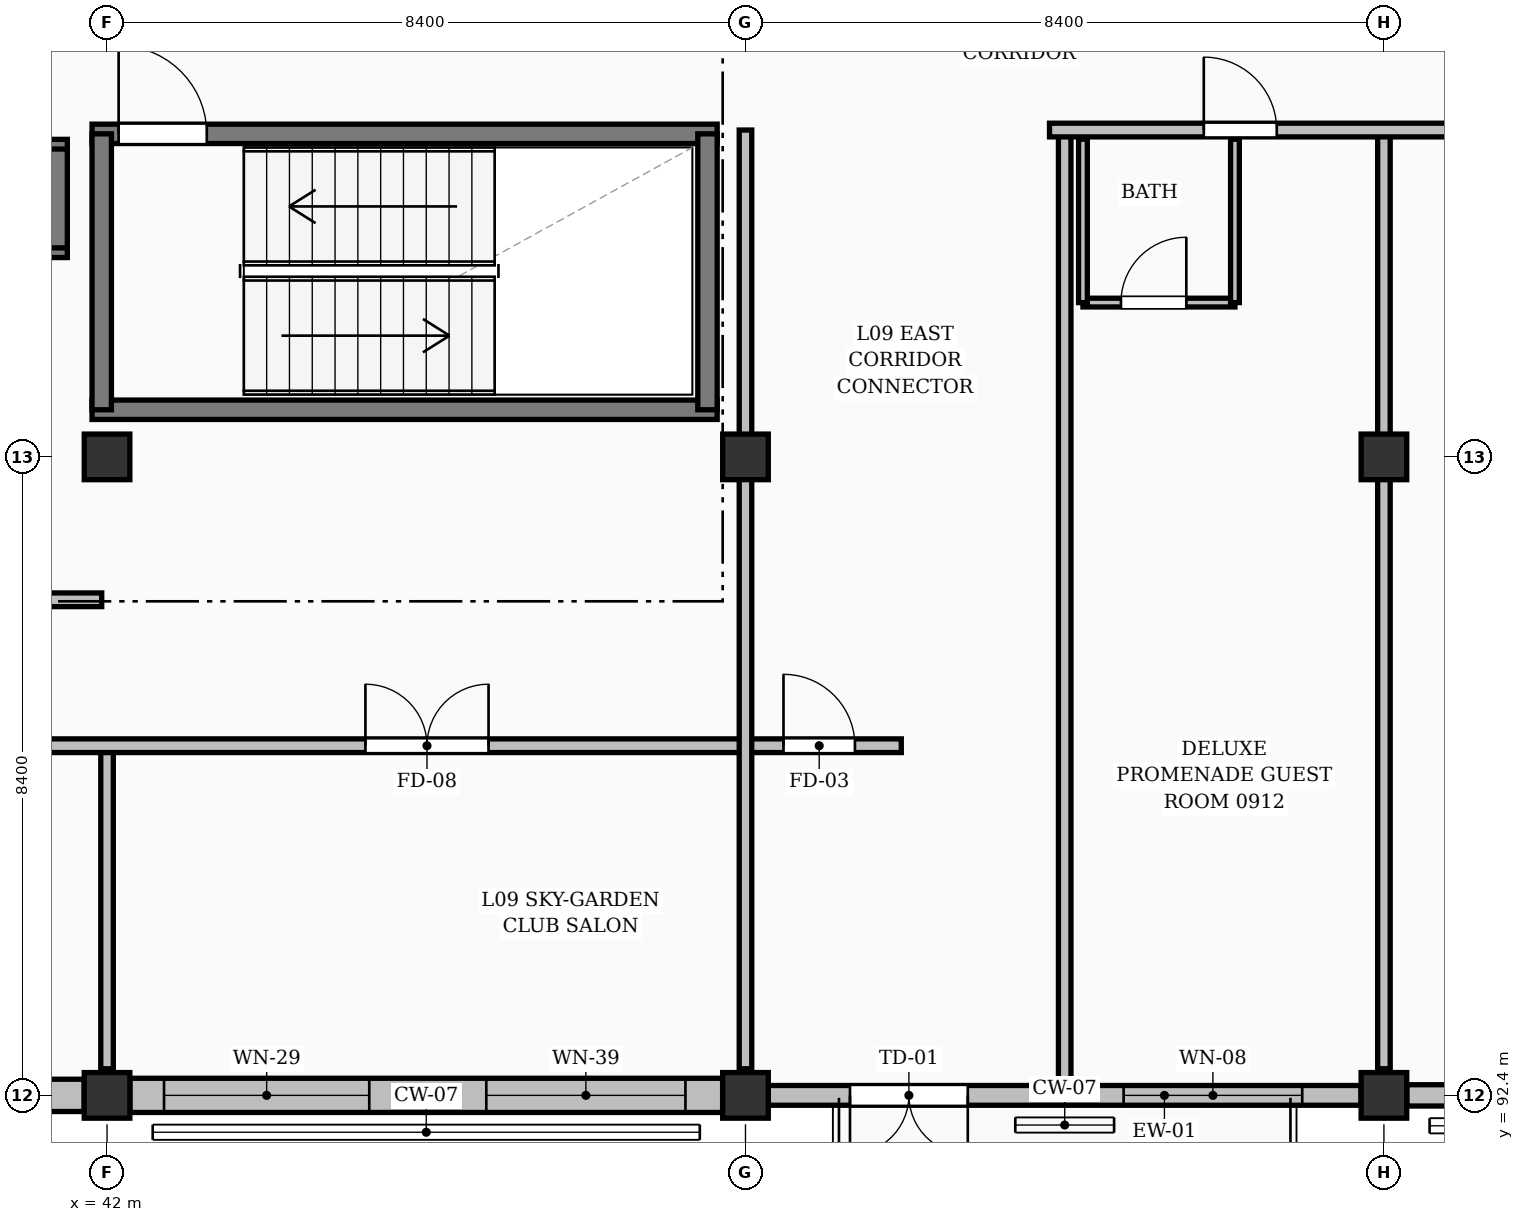
"""IFC4 building model, lengths in metres.
Left out: names, types, materials, properties, quantities, classifications, styles, units other than length and angle.
Written with IfcOpenShell. Run it as: python <this file> out.ifc"""

import sys

from ifc_helpers import new_model, si_unit, direction, frame, frame_2d, origin, origin_2d, place, context, subcontext, project, spatial, rectangle, extrude, element, fill, save


model = new_model("IFC4")
c1 = context("Model", 3, precision=1e-05, world=origin(), true_north=direction((0.0, 1.0)))
c2 = subcontext(c1, "Body", "Model", "MODEL_VIEW")
j1 = project(units=[si_unit("LENGTHUNIT", "METRE"), si_unit("PLANEANGLEUNIT", "RADIAN")], contexts=[c1])
p1 = place(None, origin())
s1 = spatial("IfcSite", under=j1, at=p1, CompositionType="ELEMENT")
p2 = place(p1, origin())
s2 = spatial("IfcBuilding", under=s1, at=p2, CompositionType="ELEMENT")
p3 = place(p2, frame((0.0, 0.0, 31.92)))
s3 = spatial("IfcBuildingStorey", under=s2, at=p3, CompositionType="ELEMENT", Elevation=31.92)
for number, where, z_axis, x_axis in (
    (1, (42.0, 92.4, 0.0), (0.0, 0.0, 1.0), (1.0, 0.0, 0.0)),
    (2, (42.0, 100.8, 0.0), (0.0, 0.0, 1.0), (1.0, 0.0, 0.0)),
    (3, (50.4, 92.4, 0.0), (0.0, 0.0, 1.0), (1.0, 0.0, 0.0)),
    (4, (50.4, 100.8, 0.0), (0.0, 0.0, 1.0), (1.0, 0.0, 0.0)),
    (5, (58.8, 92.4, 0.0), (0.0, 0.0, 1.0), (1.0, 0.0, 0.0)),
    (6, (58.8, 100.8, 0.0), (0.0, 0.0, 1.0), (1.0, 0.0, 0.0)),
):
    element("IfcColumn", number, at=place(p3, frame(where, z_axis=z_axis, x_axis=x_axis)), inside=s3, PredefinedType="COLUMN", context=c2, shape_type="SweptSolid", body=[
        extrude(rectangle(XDim=0.6, YDim=0.6, at=origin_2d()), origin(), (0.0, 0.0, 1.0), 3.36),
    ])
p4 = place(p3, frame((33.901, 92.4, 0.0), z_axis=(0.0, 0.0, 1.0), x_axis=(1.0, 0.0, 0.0)))
e7 = element("IfcWall", 7, at=p4, inside=s3, PredefinedType="SOLIDWALL", context=c2, shape_type="SweptSolid", body=[
    extrude(rectangle(XDim=7.798, YDim=0.425, at=frame_2d((3.899, 0.0))), origin(), (0.0, 0.0, 1.0), 2.474),
])
p5 = place(p4, frame((0.974, 0.0, 0.0)))
e8 = element("IfcOpeningElement", 8, at=p5, cuts=e7, PredefinedType="OPENING", context=c2, shape_type="SweptSolid", body=[
    extrude(rectangle(XDim=1.75, YDim=2.08, at=frame_2d((0.875, 1.04))), frame((0.0, 0.223, 0.0), z_axis=(0.0, -1.0, 0.0), x_axis=(1.0, 0.0, 0.0)), (0.0, 0.0, 1.0), 0.445),
])
p6 = place(p4, frame((4.724, 0.0, 0.25)))
e9 = element("IfcOpeningElement", 9, at=p6, cuts=e7, PredefinedType="OPENING", context=c2, shape_type="SweptSolid", body=[
    extrude(rectangle(XDim=2.25, YDim=2.05, at=frame_2d((1.125, 1.025))), frame((0.0, 0.223, 0.0), z_axis=(0.0, -1.0, 0.0), x_axis=(1.0, 0.0, 0.0)), (0.0, 0.0, 1.0), 0.445),
])
p7 = place(p3, frame((42.301, 92.4, 0.0), z_axis=(0.0, 0.0, 1.0), x_axis=(1.0, 0.0, 0.0)))
e10 = element("IfcWall", 10, at=p7, inside=s3, PredefinedType="SOLIDWALL", context=c2, shape_type="SweptSolid", body=[
    extrude(rectangle(XDim=7.798, YDim=0.45, at=frame_2d((3.899, 0.0))), origin(), (0.0, 0.0, 1.0), 2.474),
])
p8 = place(p7, frame((0.449, 0.0, 0.25)))
e11 = element("IfcOpeningElement", 11, at=p8, cuts=e10, PredefinedType="OPENING", context=c2, shape_type="SweptSolid", body=[
    extrude(rectangle(XDim=2.7, YDim=1.75, at=frame_2d((1.35, 0.875))), frame((0.0, 0.235, 0.0), z_axis=(0.0, -1.0, 0.0), x_axis=(1.0, 0.0, 0.0)), (0.0, 0.0, 1.0), 0.47),
])
p9 = place(p7, frame((4.689, 0.0, 0.25)))
e12 = element("IfcOpeningElement", 12, at=p9, cuts=e10, PredefinedType="OPENING", context=c2, shape_type="SweptSolid", body=[
    extrude(rectangle(XDim=2.62, YDim=1.9, at=frame_2d((1.31, 0.95))), frame((0.0, 0.235, 0.0), z_axis=(0.0, -1.0, 0.0), x_axis=(1.0, 0.0, 0.0)), (0.0, 0.0, 1.0), 0.47),
])
p10 = place(p3, frame((50.701, 92.4, 0.0), z_axis=(0.0, 0.0, 1.0), x_axis=(1.0, 0.0, 0.0)))
e13 = element("IfcWall", 13, at=p10, inside=s3, PredefinedType="SOLIDWALL", context=c2, shape_type="SweptSolid", body=[
    extrude(rectangle(XDim=7.798, YDim=0.26, at=frame_2d((3.899, 0.0))), origin(), (0.0, 0.0, 1.0), 2.414),
])
p11 = place(p10, frame((1.074, 0.0, 0.0)))
e14 = element("IfcOpeningElement", 14, at=p11, cuts=e13, PredefinedType="OPENING", context=c2, shape_type="SweptSolid", body=[
    extrude(rectangle(XDim=1.55, YDim=2.08, at=frame_2d((0.775, 1.04))), frame((0.0, 0.14, 0.0), z_axis=(0.0, -1.0, 0.0), x_axis=(1.0, 0.0, 0.0)), (0.0, 0.0, 1.0), 0.28),
])
p12 = place(p10, frame((4.674, 0.0, 0.25)))
e15 = element("IfcOpeningElement", 15, at=p12, cuts=e13, PredefinedType="OPENING", context=c2, shape_type="SweptSolid", body=[
    extrude(rectangle(XDim=2.35, YDim=1.95, at=frame_2d((1.175, 0.975))), frame((0.0, 0.14, 0.0), z_axis=(0.0, -1.0, 0.0), x_axis=(1.0, 0.0, 0.0)), (0.0, 0.0, 1.0), 0.28),
])
p13 = place(p3, frame((59.101, 92.4, 0.0), z_axis=(0.0, 0.0, 1.0), x_axis=(1.0, 0.0, 0.0)))
e16 = element("IfcWall", 16, at=p13, inside=s3, PredefinedType="SOLIDWALL", context=c2, shape_type="SweptSolid", body=[
    extrude(rectangle(XDim=7.798, YDim=0.28, at=frame_2d((3.899, 0.0))), origin(), (0.0, 0.0, 1.0), 2.414),
])
p14 = place(p13, frame((0.549, 0.0, 0.25)))
e17 = element("IfcOpeningElement", 17, at=p14, cuts=e16, PredefinedType="OPENING", context=c2, shape_type="SweptSolid", body=[
    extrude(rectangle(XDim=2.5, YDim=1.75, at=frame_2d((1.25, 0.875))), frame((0.0, 0.15, 0.0), z_axis=(0.0, -1.0, 0.0), x_axis=(1.0, 0.0, 0.0)), (0.0, 0.0, 1.0), 0.3),
])
p15 = place(p13, frame((4.649, 0.0, 0.25)))
e18 = element("IfcOpeningElement", 18, at=p15, cuts=e16, PredefinedType="OPENING", context=c2, shape_type="SweptSolid", body=[
    extrude(rectangle(XDim=2.7, YDim=1.75, at=frame_2d((1.35, 0.875))), frame((0.0, 0.15, 0.0), z_axis=(0.0, -1.0, 0.0), x_axis=(1.0, 0.0, 0.0)), (0.0, 0.0, 1.0), 0.3),
])
p16 = place(p3, frame((41.802, 101.42, 0.0), z_axis=(0.0, 0.0, 1.0), x_axis=(1.0, 0.0, 0.0)))
e19 = element("IfcWall", 19, at=p16, inside=s3, PredefinedType="SOLIDWALL", context=c2, shape_type="SweptSolid", body=[
    extrude(rectangle(XDim=8.225, YDim=0.255, at=frame_2d((4.113, 0.0))), origin(), (0.0, 0.0, 1.0), 3.1),
])
p17 = place(p3, frame((41.802, 105.05, 0.0), z_axis=(0.0, 0.0, 1.0), x_axis=(1.0, 0.0, 0.0)))
e20 = element("IfcWall", 20, at=p17, inside=s3, PredefinedType="SOLIDWALL", context=c2, shape_type="SweptSolid", body=[
    extrude(rectangle(XDim=8.225, YDim=0.255, at=frame_2d((4.113, 0.0))), origin(), (0.0, 0.0, 1.0), 3.1),
])
p18 = place(p17, frame((0.35, 0.0, 0.0)))
e21 = element("IfcOpeningElement", 21, at=p18, cuts=e20, PredefinedType="OPENING", context=c2, shape_type="SweptSolid", body=[
    extrude(rectangle(XDim=1.16, YDim=2.15, at=frame_2d((0.58, 1.075))), frame((0.0, 0.137, 0.0), z_axis=(0.0, -1.0, 0.0), x_axis=(1.0, 0.0, 0.0)), (0.0, 0.0, 1.0), 0.275),
])
for number, where, z_axis, x_axis in (
    (22, (41.93, 101.42, 0.0), (0.0, 0.0, 1.0), (0.0, 1.0, 0.0)),
    (23, (49.9, 101.42, 0.0), (0.0, 0.0, 1.0), (0.0, 1.0, 0.0)),
):
    element("IfcWall", number, at=place(p3, frame(where, z_axis=z_axis, x_axis=x_axis)), inside=s3, PredefinedType="SOLIDWALL", context=c2, shape_type="SweptSolid", body=[
        extrude(rectangle(XDim=3.63, YDim=0.255, at=frame_2d((1.815, 0.0))), origin(), (0.0, 0.0, 1.0), 3.1),
    ])
p19 = place(p3, frame((39.522, 103.55, 0.0), z_axis=(0.0, 0.0, 1.0), x_axis=(1.0, 0.0, 0.0)))
e24 = element("IfcWall", 24, at=p19, inside=s3, PredefinedType="SOLIDWALL", context=c2, shape_type="SweptSolid", body=[
    extrude(rectangle(XDim=1.955, YDim=0.255, at=frame_2d((0.978, 0.0))), origin(), (0.0, 0.0, 1.0), 3.1),
])
p20 = place(p3, frame((39.522, 104.85, 0.0), z_axis=(0.0, 0.0, 1.0), x_axis=(1.0, 0.0, 0.0)))
e25 = element("IfcWall", 25, at=p20, inside=s3, PredefinedType="SOLIDWALL", context=c2, shape_type="SweptSolid", body=[
    extrude(rectangle(XDim=1.955, YDim=0.255, at=frame_2d((0.978, 0.0))), origin(), (0.0, 0.0, 1.0), 3.1),
])
p21 = place(p20, frame((0.508, 0.0, 0.0)))
e26 = element("IfcOpeningElement", 26, at=p21, cuts=e25, PredefinedType="OPENING", context=c2, shape_type="SweptSolid", body=[
    extrude(rectangle(XDim=0.94, YDim=2.1, at=frame_2d((0.47, 1.05))), frame((0.0, 0.137, 0.0), z_axis=(0.0, -1.0, 0.0), x_axis=(1.0, 0.0, 0.0)), (0.0, 0.0, 1.0), 0.275),
])
p22 = place(p3, frame((41.35, 103.55, 0.0), z_axis=(0.0, 0.0, 1.0), x_axis=(0.0, 1.0, 0.0)))
e27 = element("IfcWall", 27, at=p22, inside=s3, PredefinedType="SOLIDWALL", context=c2, shape_type="SweptSolid", body=[
    extrude(rectangle(XDim=1.3, YDim=0.255, at=frame_2d((0.65, 0.0))), origin(), (0.0, 0.0, 1.0), 3.1),
])
p23 = place(p3, frame((42.0, 92.75, 0.0), z_axis=(0.0, 0.0, 1.0), x_axis=(0.0, 1.0, 0.0)))
e28 = element("IfcWall", 28, at=p23, inside=s3, PredefinedType="PARTITIONING", context=c2, shape_type="SweptSolid", body=[
    extrude(rectangle(XDim=4.25, YDim=0.165, at=frame_2d((2.125, 0.0))), origin(), (0.0, 0.0, 1.0), 2.435),
])
p24 = place(p3, frame((8.562, 97.0, 0.0), z_axis=(0.0, 0.0, 1.0), x_axis=(1.0, 0.0, 0.0)))
e29 = element("IfcWall", 29, at=p24, inside=s3, PredefinedType="PARTITIONING", context=c2, shape_type="SweptSolid", body=[
    extrude(rectangle(XDim=41.837, YDim=0.18, at=frame_2d((20.919, 0.0))), origin(), (0.0, 0.0, 1.0), 3.1),
])
p25 = place(p24, frame((1.207, 0.0, 0.0)))
e30 = element("IfcOpeningElement", 30, at=p25, cuts=e29, PredefinedType="OPENING", context=c2, shape_type="SweptSolid", body=[
    extrude(rectangle(XDim=0.96, YDim=2.15, at=frame_2d((0.48, 1.075))), frame((0.0, 0.1, 0.0), z_axis=(0.0, -1.0, 0.0), x_axis=(1.0, 0.0, 0.0)), (0.0, 0.0, 1.0), 0.2),
])
p26 = place(p24, frame((5.867, 0.0, 0.0)))
e31 = element("IfcOpeningElement", 31, at=p26, cuts=e29, PredefinedType="OPENING", context=c2, shape_type="SweptSolid", body=[
    extrude(rectangle(XDim=0.96, YDim=2.15, at=frame_2d((0.48, 1.075))), frame((0.0, 0.1, 0.0), z_axis=(0.0, -1.0, 0.0), x_axis=(1.0, 0.0, 0.0)), (0.0, 0.0, 1.0), 0.2),
])
p27 = place(p24, frame((9.608, 0.0, 0.0)))
e32 = element("IfcOpeningElement", 32, at=p27, cuts=e29, PredefinedType="OPENING", context=c2, shape_type="SweptSolid", body=[
    extrude(rectangle(XDim=0.96, YDim=2.15, at=frame_2d((0.48, 1.075))), frame((0.0, 0.1, 0.0), z_axis=(0.0, -1.0, 0.0), x_axis=(1.0, 0.0, 0.0)), (0.0, 0.0, 1.0), 0.2),
])
p28 = place(p24, frame((14.267, 0.0, 0.0)))
e33 = element("IfcOpeningElement", 33, at=p28, cuts=e29, PredefinedType="OPENING", context=c2, shape_type="SweptSolid", body=[
    extrude(rectangle(XDim=0.96, YDim=2.15, at=frame_2d((0.48, 1.075))), frame((0.0, 0.1, 0.0), z_axis=(0.0, -1.0, 0.0), x_axis=(1.0, 0.0, 0.0)), (0.0, 0.0, 1.0), 0.2),
])
p29 = place(p24, frame((18.008, 0.0, 0.0)))
e34 = element("IfcOpeningElement", 34, at=p29, cuts=e29, PredefinedType="OPENING", context=c2, shape_type="SweptSolid", body=[
    extrude(rectangle(XDim=0.96, YDim=2.15, at=frame_2d((0.48, 1.075))), frame((0.0, 0.1, 0.0), z_axis=(0.0, -1.0, 0.0), x_axis=(1.0, 0.0, 0.0)), (0.0, 0.0, 1.0), 0.2),
])
p30 = place(p24, frame((22.668, 0.0, 0.0)))
e35 = element("IfcOpeningElement", 35, at=p30, cuts=e29, PredefinedType="OPENING", context=c2, shape_type="SweptSolid", body=[
    extrude(rectangle(XDim=0.96, YDim=2.15, at=frame_2d((0.48, 1.075))), frame((0.0, 0.1, 0.0), z_axis=(0.0, -1.0, 0.0), x_axis=(1.0, 0.0, 0.0)), (0.0, 0.0, 1.0), 0.2),
])
p31 = place(p24, frame((26.407, 0.0, 0.0)))
e36 = element("IfcOpeningElement", 36, at=p31, cuts=e29, PredefinedType="OPENING", context=c2, shape_type="SweptSolid", body=[
    extrude(rectangle(XDim=0.96, YDim=2.15, at=frame_2d((0.48, 1.075))), frame((0.0, 0.1, 0.0), z_axis=(0.0, -1.0, 0.0), x_axis=(1.0, 0.0, 0.0)), (0.0, 0.0, 1.0), 0.2),
])
p32 = place(p24, frame((31.068, 0.0, 0.0)))
e37 = element("IfcOpeningElement", 37, at=p32, cuts=e29, PredefinedType="OPENING", context=c2, shape_type="SweptSolid", body=[
    extrude(rectangle(XDim=0.96, YDim=2.15, at=frame_2d((0.48, 1.075))), frame((0.0, 0.1, 0.0), z_axis=(0.0, -1.0, 0.0), x_axis=(1.0, 0.0, 0.0)), (0.0, 0.0, 1.0), 0.2),
])
p33 = place(p24, frame((36.837, 0.0, 0.0)))
e38 = element("IfcOpeningElement", 38, at=p33, cuts=e29, PredefinedType="OPENING", context=c2, shape_type="SweptSolid", body=[
    extrude(rectangle(XDim=1.62, YDim=2.2, at=frame_2d((0.81, 1.1))), frame((0.0, 0.1, 0.0), z_axis=(0.0, -1.0, 0.0), x_axis=(1.0, 0.0, 0.0)), (0.0, 0.0, 1.0), 0.2),
])
p34 = place(p3, frame((33.0, 98.92, 0.0), z_axis=(0.0, 0.0, 1.0), x_axis=(1.0, 0.0, 0.0)))
e39 = element("IfcWall", 39, at=p34, inside=s3, PredefinedType="PARTITIONING", context=c2, shape_type="SweptSolid", body=[
    extrude(rectangle(XDim=8.93, YDim=0.18, at=frame_2d((4.465, 0.0))), origin(), (0.0, 0.0, 1.0), 3.1),
])
p35 = place(p34, frame((3.25, 0.0, 0.0)))
e40 = element("IfcOpeningElement", 40, at=p35, cuts=e39, PredefinedType="OPENING", context=c2, shape_type="SweptSolid", body=[
    extrude(rectangle(XDim=1.1, YDim=2.1, at=frame_2d((0.55, 1.05))), frame((0.0, 0.1, 0.0), z_axis=(0.0, -1.0, 0.0), x_axis=(1.0, 0.0, 0.0)), (0.0, 0.0, 1.0), 0.2),
])
p36 = place(p3, frame((50.4, 97.0, 0.0), z_axis=(0.0, 0.0, 1.0), x_axis=(1.0, 0.0, 0.0)))
e41 = element("IfcWall", 41, at=p36, inside=s3, PredefinedType="PARTITIONING", context=c2, shape_type="SweptSolid", body=[
    extrude(rectangle(XDim=2.05, YDim=0.18, at=frame_2d((1.025, 0.0))), origin(), (0.0, 0.0, 1.0), 3.1),
])
p37 = place(p36, frame((0.5, 0.0, 0.0)))
e42 = element("IfcOpeningElement", 42, at=p37, cuts=e41, PredefinedType="OPENING", context=c2, shape_type="SweptSolid", body=[
    extrude(rectangle(XDim=0.94, YDim=2.1, at=frame_2d((0.47, 1.05))), frame((0.0, 0.1, 0.0), z_axis=(0.0, -1.0, 0.0), x_axis=(1.0, 0.0, 0.0)), (0.0, 0.0, 1.0), 0.2),
])
p38 = place(p3, frame((54.84, 102.83, 0.0), z_axis=(0.0, 0.0, 1.0), x_axis=(1.0, 0.0, 0.0)))
e43 = element("IfcWall", 43, at=p38, inside=s3, PredefinedType="PARTITIONING", context=c2, shape_type="SweptSolid", body=[
    extrude(rectangle(XDim=2.0, YDim=0.115, at=frame_2d((1.0, 0.0))), origin(), (0.0, 0.0, 1.0), 3.1),
])
p39 = place(p38, frame((0.5, 0.0, 0.0)))
e44 = element("IfcOpeningElement", 44, at=p39, cuts=e43, PredefinedType="OPENING", context=c2, shape_type="SweptSolid", body=[
    extrude(rectangle(XDim=0.86, YDim=2.05, at=frame_2d((0.43, 1.025))), frame((0.0, 0.067, 0.0), z_axis=(0.0, -1.0, 0.0), x_axis=(1.0, 0.0, 0.0)), (0.0, 0.0, 1.0), 0.135),
])
for number, where, z_axis, x_axis in (
    (45, (54.84, 102.83, 0.0), (0.0, 0.0, 1.0), (0.0, 1.0, 0.0)),
    (46, (56.84, 102.83, 0.0), (0.0, 0.0, 1.0), (0.0, 1.0, 0.0)),
):
    element("IfcWall", number, at=place(p3, frame(where, z_axis=z_axis, x_axis=x_axis)), inside=s3, PredefinedType="PARTITIONING", context=c2, shape_type="SweptSolid", body=[
        extrude(rectangle(XDim=2.15, YDim=0.115, at=frame_2d((1.075, 0.0))), origin(), (0.0, 0.0, 1.0), 3.1),
    ])
p40 = place(p3, frame((54.6, 92.53, 0.0), z_axis=(0.0, 0.0, 1.0), x_axis=(0.0, 1.0, 0.0)))
e47 = element("IfcWall", 47, at=p40, inside=s3, PredefinedType="PARTITIONING", context=c2, shape_type="SweptSolid", body=[
    extrude(rectangle(XDim=12.57, YDim=0.165, at=frame_2d((6.285, 0.0))), origin(), (0.0, 0.0, 1.0), 3.1),
])
for number, where, z_axis, x_axis in (
    (48, (50.4, 92.75, 0.0), (0.0, 0.0, 1.0), (0.0, 1.0, 0.0)),
    (49, (58.8, 92.75, 0.0), (0.0, 0.0, 1.0), (0.0, 1.0, 0.0)),
):
    element("IfcWall", number, at=place(p3, frame(where, z_axis=z_axis, x_axis=x_axis)), inside=s3, PredefinedType="PARTITIONING", context=c2, shape_type="SweptSolid", body=[
        extrude(rectangle(XDim=12.35, YDim=0.165, at=frame_2d((6.175, 0.0))), origin(), (0.0, 0.0, 1.0), 2.375),
    ])
p41 = place(p3, frame((54.4, 105.1, 0.0), z_axis=(0.0, 0.0, 1.0), x_axis=(1.0, 0.0, 0.0)))
e50 = element("IfcWall", 50, at=p41, inside=s3, PredefinedType="PARTITIONING", context=c2, shape_type="SweptSolid", body=[
    extrude(rectangle(XDim=12.625, YDim=0.18, at=frame_2d((6.312, 0.0))), origin(), (0.0, 0.0, 1.0), 3.1),
])
p42 = place(p41, frame((2.03, 0.0, 0.0)))
e51 = element("IfcOpeningElement", 51, at=p42, cuts=e50, PredefinedType="OPENING", context=c2, shape_type="SweptSolid", body=[
    extrude(rectangle(XDim=0.96, YDim=2.15, at=frame_2d((0.48, 1.075))), frame((0.0, 0.1, 0.0), z_axis=(0.0, -1.0, 0.0), x_axis=(1.0, 0.0, 0.0)), (0.0, 0.0, 1.0), 0.2),
])
p43 = place(p41, frame((5.9, 0.0, 0.0)))
e52 = element("IfcOpeningElement", 52, at=p43, cuts=e50, PredefinedType="OPENING", context=c2, shape_type="SweptSolid", body=[
    extrude(rectangle(XDim=1.02, YDim=2.15, at=frame_2d((0.51, 1.075))), frame((0.0, 0.1, 0.0), z_axis=(0.0, -1.0, 0.0), x_axis=(1.0, 0.0, 0.0)), (0.0, 0.0, 1.0), 0.2),
])
p44 = place(p8, origin())
e53 = element("IfcWindow", 53, at=p44, inside=s3, PartitioningType="DOUBLE_PANEL_VERTICAL", PredefinedType="WINDOW", context=c2, shape_type="SweptSolid", body=[
    extrude(rectangle(XDim=2.7, YDim=1.75, at=frame_2d((1.35, 0.875))), frame((0.0, 0.03, 0.0), z_axis=(0.0, -1.0, 0.0), x_axis=(1.0, 0.0, 0.0)), (0.0, 0.0, 1.0), 0.06),
])
fill(e11, e53)
p45 = place(p9, origin())
e54 = element("IfcWindow", 54, at=p45, inside=s3, PartitioningType="DOUBLE_PANEL_VERTICAL", PredefinedType="WINDOW", context=c2, shape_type="SweptSolid", body=[
    extrude(rectangle(XDim=2.62, YDim=1.9, at=frame_2d((1.31, 0.95))), frame((0.0, 0.03, 0.0), z_axis=(0.0, -1.0, 0.0), x_axis=(1.0, 0.0, 0.0)), (0.0, 0.0, 1.0), 0.06),
])
fill(e12, e54)
p46 = place(p11, frame((1.55, 0.0, 0.0), z_axis=(0.0, 0.0, 1.0), x_axis=(-1.0, 0.0, 0.0)))
e55 = element("IfcDoor", 55, at=p46, inside=s3, OperationType="DOUBLE_DOOR_SINGLE_SWING", PredefinedType="DOOR", context=c2, shape_type="SweptSolid", body=[
    extrude(rectangle(XDim=1.55, YDim=2.08, at=frame_2d((0.775, 1.04))), frame((0.0, 0.025, 0.0), z_axis=(0.0, -1.0, 0.0), x_axis=(1.0, 0.0, 0.0)), (0.0, 0.0, 1.0), 0.05),
])
fill(e14, e55)
p47 = place(p12, origin())
e56 = element("IfcWindow", 56, at=p47, inside=s3, PartitioningType="DOUBLE_PANEL_VERTICAL", PredefinedType="WINDOW", context=c2, shape_type="SweptSolid", body=[
    extrude(rectangle(XDim=2.35, YDim=1.95, at=frame_2d((1.175, 0.975))), frame((0.0, 0.03, 0.0), z_axis=(0.0, -1.0, 0.0), x_axis=(1.0, 0.0, 0.0)), (0.0, 0.0, 1.0), 0.06),
])
fill(e15, e56)
p48 = place(p18, origin())
e57 = element("IfcDoor", 57, at=p48, inside=s3, OperationType="SINGLE_SWING_LEFT", PredefinedType="DOOR", context=c2, shape_type="SweptSolid", body=[
    extrude(rectangle(XDim=1.16, YDim=2.15, at=frame_2d((0.58, 1.075))), frame((0.0, 0.025, 0.0), z_axis=(0.0, -1.0, 0.0), x_axis=(1.0, 0.0, 0.0)), (0.0, 0.0, 1.0), 0.05),
])
fill(e21, e57)
p49 = place(p33, origin())
e58 = element("IfcDoor", 58, at=p49, inside=s3, OperationType="DOUBLE_DOOR_SINGLE_SWING", PredefinedType="DOOR", context=c2, shape_type="SweptSolid", body=[
    extrude(rectangle(XDim=1.62, YDim=2.2, at=frame_2d((0.81, 1.1))), frame((0.0, 0.025, 0.0), z_axis=(0.0, -1.0, 0.0), x_axis=(1.0, 0.0, 0.0)), (0.0, 0.0, 1.0), 0.05),
])
fill(e38, e58)
p50 = place(p37, origin())
e59 = element("IfcDoor", 59, at=p50, inside=s3, OperationType="SINGLE_SWING_LEFT", PredefinedType="DOOR", context=c2, shape_type="SweptSolid", body=[
    extrude(rectangle(XDim=0.94, YDim=2.1, at=frame_2d((0.47, 1.05))), frame((0.0, 0.025, 0.0), z_axis=(0.0, -1.0, 0.0), x_axis=(1.0, 0.0, 0.0)), (0.0, 0.0, 1.0), 0.05),
])
fill(e42, e59)
p51 = place(p39, origin())
e60 = element("IfcDoor", 60, at=p51, inside=s3, OperationType="SINGLE_SWING_RIGHT", PredefinedType="DOOR", context=c2, shape_type="SweptSolid", body=[
    extrude(rectangle(XDim=0.86, YDim=2.05, at=frame_2d((0.43, 1.025))), frame((0.0, 0.025, 0.0), z_axis=(0.0, -1.0, 0.0), x_axis=(1.0, 0.0, 0.0)), (0.0, 0.0, 1.0), 0.05),
])
fill(e44, e60)
p52 = place(p42, origin())
e61 = element("IfcDoor", 61, at=p52, inside=s3, OperationType="SINGLE_SWING_LEFT", PredefinedType="DOOR", context=c2, shape_type="SweptSolid", body=[
    extrude(rectangle(XDim=0.96, YDim=2.15, at=frame_2d((0.48, 1.075))), frame((0.0, 0.025, 0.0), z_axis=(0.0, -1.0, 0.0), x_axis=(1.0, 0.0, 0.0)), (0.0, 0.0, 1.0), 0.05),
])
fill(e51, e61)
save(model, sys.argv[1])
